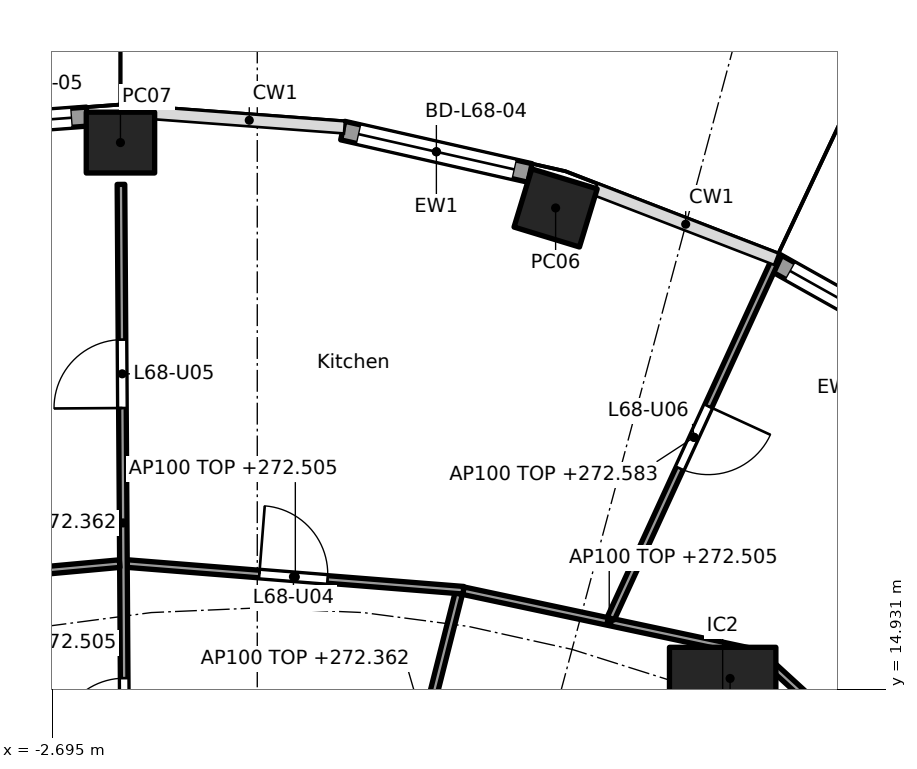
"""IFC4 building model, lengths in metres.
Left out: names, types, materials, properties, quantities, classifications, styles, units other than length and angle.
Written with IfcOpenShell. Run it as: python <this file> out.ifc"""

import sys

from ifc_helpers import new_model, si_unit, direction, frame, frame_2d, origin, origin_2d, place, context, subcontext, project, spatial, rectangle, hollow_rectangle, extrude, element, fill, save


model = new_model("IFC4")
c1 = context("Model", 3, precision=1e-05, world=origin(), true_north=direction((0.0, 1.0)))
c2 = subcontext(c1, "Body", "Model", "MODEL_VIEW")
j1 = project(units=[si_unit("LENGTHUNIT", "METRE"), si_unit("PLANEANGLEUNIT", "RADIAN")], contexts=[c1])
p1 = place(None, origin())
s1 = spatial("IfcSite", under=j1, at=p1, CompositionType="ELEMENT")
p2 = place(p1, origin())
s2 = spatial("IfcBuilding", under=s1, at=p2, CompositionType="ELEMENT")
p3 = place(p2, frame((0.0, 0.0, 269.6)))
s3 = spatial("IfcBuildingStorey", under=s2, at=p3, CompositionType="ELEMENT", Elevation=269.6)
for number, where, z_axis, x_axis in (
    (1, (3.925, 21.262, 0.0), (0.0, 0.0, 1.0), (-0.957, 0.292, 0.0)),
    (2, (-1.8, 22.122, 0.0), (0.0, 0.0, 1.0), (-1.0, 0.0, 0.0)),
):
    element("IfcColumn", number, at=place(p3, frame(where, z_axis=z_axis, x_axis=x_axis)), inside=s3, PredefinedType="COLUMN", context=c2, shape_type="SweptSolid", body=[
        extrude(hollow_rectangle(XDim=0.9, YDim=0.8, WallThickness=0.028, at=origin_2d()), origin(), (0.0, 0.0, 1.0), 3.7),
    ])
p4 = place(p3, frame((6.123, 14.782, 0.0), z_axis=(0.0, 0.0, 1.0), x_axis=(1.0, 0.0, 0.0)))
e3 = element("IfcColumn", 3, at=p4, inside=s3, PredefinedType="COLUMN", context=c2, shape_type="SweptSolid", body=[
    extrude(rectangle(XDim=1.4, YDim=1.4, at=origin_2d()), origin(), (0.0, 0.0, 1.0), 3.7),
])
p5 = place(p3, frame((6.795, 20.554, 0.0), z_axis=(0.0, 0.0, 1.0), x_axis=(0.872052877201, -0.489411666561, 0.0)))
e4 = element("IfcWall", 4, at=p5, inside=s3, PredefinedType="SOLIDWALL", context=c2, shape_type="SweptSolid", body=[
    extrude(rectangle(XDim=2.593, YDim=0.25, at=frame_2d((1.296, 0.0))), origin(), (0.0, 0.0, 1.0), 3.44),
])
p6 = place(p5, frame((0.247, 0.0, 0.0)))
e5 = element("IfcOpeningElement", 5, at=p6, cuts=e4, PredefinedType="OPENING", context=c2, shape_type="SweptSolid", body=[
    extrude(rectangle(XDim=2.1, YDim=2.4, at=frame_2d((1.05, 1.2))), frame((0.0, 0.135, 0.0), z_axis=(0.0, -1.0, 0.0), x_axis=(1.0, 0.0, 0.0)), (0.0, 0.0, 1.0), 0.27),
])
p7 = place(p3, frame((1.125, 22.28, 0.0), z_axis=(0.0, 0.0, 1.0), x_axis=(0.97531487046, -0.22081871175, 0.0)))
e6 = element("IfcWall", 6, at=p7, inside=s3, PredefinedType="SOLIDWALL", context=c2, shape_type="SweptSolid", body=[
    extrude(rectangle(XDim=2.525, YDim=0.25, at=frame_2d((1.263, 0.0))), origin(), (0.0, 0.0, 1.0), 3.44),
])
p8 = place(p7, frame((0.213, 0.0, 0.0)))
e7 = element("IfcOpeningElement", 7, at=p8, cuts=e6, PredefinedType="OPENING", context=c2, shape_type="SweptSolid", body=[
    extrude(rectangle(XDim=2.1, YDim=2.4, at=frame_2d((1.05, 1.2))), frame((0.0, 0.135, 0.0), z_axis=(0.0, -1.0, 0.0), x_axis=(1.0, 0.0, 0.0)), (0.0, 0.0, 1.0), 0.27),
])
p9 = place(p3, frame((-4.743, 22.277, 0.0), z_axis=(0.0, 0.0, 1.0), x_axis=(0.99722914645, 0.074391057731, 0.0)))
e8 = element("IfcWall", 8, at=p9, inside=s3, PredefinedType="SOLIDWALL", context=c2, shape_type="SweptSolid", body=[
    extrude(rectangle(XDim=2.51, YDim=0.25, at=frame_2d((1.255, 0.0))), origin(), (0.0, 0.0, 1.0), 3.44),
])
p10 = place(p9, frame((0.205, 0.0, 0.0)))
e9 = element("IfcOpeningElement", 9, at=p10, cuts=e8, PredefinedType="OPENING", context=c2, shape_type="SweptSolid", body=[
    extrude(rectangle(XDim=2.1, YDim=2.4, at=frame_2d((1.05, 1.2))), frame((0.0, 0.135, 0.0), z_axis=(0.0, -1.0, 0.0), x_axis=(1.0, 0.0, 0.0)), (0.0, 0.0, 1.0), 0.27),
])
p11 = place(p3, frame((10.972, 11.398, 0.0), z_axis=(0.0, 0.0, 1.0), x_axis=(-0.737838738013, 0.674977034193, 0.0)))
e10 = element("IfcWall", 10, at=p11, inside=s3, PredefinedType="PARTITIONING", context=c2, shape_type="SweptSolid", body=[
    extrude(rectangle(XDim=5.977, YDim=0.1, at=frame_2d((2.989, 0.0))), origin(), (0.0, 0.0, 1.0), 2.905),
])
p12 = place(p11, frame((2.514, 0.0, 0.0)))
e11 = element("IfcOpeningElement", 11, at=p12, cuts=e10, PredefinedType="OPENING", context=c2, shape_type="SweptSolid", body=[
    extrude(rectangle(XDim=0.9, YDim=2.1, at=frame_2d((0.45, 1.05))), frame((0.0, 0.06, 0.0), z_axis=(0.0, -1.0, 0.0), x_axis=(1.0, 0.0, 0.0)), (0.0, 0.0, 1.0), 0.12),
])
p13 = place(p3, frame((6.55, 15.409, 0.0), z_axis=(0.0, 0.0, 1.0), x_axis=(-0.978051195976, 0.208364723621, 0.0)))
e12 = element("IfcWall", 12, at=p13, inside=s3, PredefinedType="PARTITIONING", context=c2, shape_type="SweptSolid", body=[
    extrude(rectangle(XDim=3.924, YDim=0.1, at=frame_2d((1.962, 0.0))), origin(), (0.0, 0.0, 1.0), 2.905),
])
p14 = place(p3, frame((4.651, 15.863, 0.0), z_axis=(0.0, 0.0, 1.0), x_axis=(0.41744196735, 0.908703584176, 0.0)))
e13 = element("IfcWall", 13, at=p14, inside=s3, PredefinedType="PARTITIONING", context=c2, shape_type="SweptSolid", body=[
    extrude(rectangle(XDim=5.242, YDim=0.1, at=frame_2d((2.621, 0.0))), origin(), (0.0, 0.0, 1.0), 2.983),
])
p15 = place(p14, frame((2.171, 0.0, 0.0)))
e14 = element("IfcOpeningElement", 14, at=p15, cuts=e13, PredefinedType="OPENING", context=c2, shape_type="SweptSolid", body=[
    extrude(rectangle(XDim=0.9, YDim=2.1, at=frame_2d((0.45, 1.05))), frame((0.0, 0.06, 0.0), z_axis=(0.0, -1.0, 0.0), x_axis=(1.0, 0.0, 0.0)), (0.0, 0.0, 1.0), 0.12),
])
p16 = place(p3, frame((1.759, 12.662, 0.0), z_axis=(0.0, 0.0, 1.0), x_axis=(0.244966765147, 0.969531476525, 0.0)))
e15 = element("IfcWall", 15, at=p16, inside=s3, PredefinedType="PARTITIONING", context=c2, shape_type="SweptSolid", body=[
    extrude(rectangle(XDim=3.638, YDim=0.1, at=frame_2d((1.819, 0.0))), origin(), (0.0, 0.0, 1.0), 2.762),
])
p17 = place(p16, frame((1.369, 0.0, 0.0)))
e16 = element("IfcOpeningElement", 16, at=p17, cuts=e15, PredefinedType="OPENING", context=c2, shape_type="SweptSolid", body=[
    extrude(rectangle(XDim=0.9, YDim=2.1, at=frame_2d((0.45, 1.05))), frame((0.0, 0.06, 0.0), z_axis=(0.0, -1.0, 0.0), x_axis=(1.0, 0.0, 0.0)), (0.0, 0.0, 1.0), 0.12),
])
p18 = place(p3, frame((2.713, 16.233, 0.0), z_axis=(0.0, 0.0, 1.0), x_axis=(-0.996870142942, 0.079056423588, 0.0)))
e17 = element("IfcWall", 17, at=p18, inside=s3, PredefinedType="PARTITIONING", context=c2, shape_type="SweptSolid", body=[
    extrude(rectangle(XDim=4.438, YDim=0.1, at=frame_2d((2.219, 0.0))), origin(), (0.0, 0.0, 1.0), 2.905),
])
p19 = place(p18, frame((1.794, 0.0, 0.0)))
e18 = element("IfcOpeningElement", 18, at=p19, cuts=e17, PredefinedType="OPENING", context=c2, shape_type="SweptSolid", body=[
    extrude(rectangle(XDim=0.9, YDim=2.1, at=frame_2d((0.45, 1.05))), frame((0.0, 0.06, 0.0), z_axis=(0.0, -1.0, 0.0), x_axis=(1.0, 0.0, 0.0)), (0.0, 0.0, 1.0), 0.12),
])
p20 = place(p3, frame((-1.736, 12.665, 0.0), z_axis=(0.0, 0.0, 1.0), x_axis=(-0.00646827636, 0.999979080482, 0.0)))
e19 = element("IfcWall", 19, at=p20, inside=s3, PredefinedType="PARTITIONING", context=c2, shape_type="SweptSolid", body=[
    extrude(rectangle(XDim=8.908, YDim=0.1, at=frame_2d((4.454, 0.0))), origin(), (0.0, 0.0, 1.0), 2.762),
])
p21 = place(p20, frame((1.512, 0.0, 0.0)))
e20 = element("IfcOpeningElement", 20, at=p21, cuts=e19, PredefinedType="OPENING", context=c2, shape_type="SweptSolid", body=[
    extrude(rectangle(XDim=0.9, YDim=2.1, at=frame_2d((0.45, 1.05))), frame((0.0, 0.06, 0.0), z_axis=(0.0, -1.0, 0.0), x_axis=(1.0, 0.0, 0.0)), (0.0, 0.0, 1.0), 0.12),
])
p22 = place(p20, frame((5.965, 0.0, 0.0)))
e21 = element("IfcOpeningElement", 21, at=p22, cuts=e19, PredefinedType="OPENING", context=c2, shape_type="SweptSolid", body=[
    extrude(rectangle(XDim=0.9, YDim=2.1, at=frame_2d((0.45, 1.05))), frame((0.0, 0.06, 0.0), z_axis=(0.0, -1.0, 0.0), x_axis=(1.0, 0.0, 0.0)), (0.0, 0.0, 1.0), 0.12),
])
p23 = place(p3, frame((-1.811, 16.583, 0.0), z_axis=(0.0, 0.0, 1.0), x_axis=(-0.995842301034, -0.091093970555, 0.0)))
e22 = element("IfcWall", 22, at=p23, inside=s3, PredefinedType="PARTITIONING", context=c2, shape_type="SweptSolid", body=[
    extrude(rectangle(XDim=4.535, YDim=0.1, at=frame_2d((2.267, 0.0))), origin(), (0.0, 0.0, 1.0), 2.905),
])
p24 = place(p3, frame((6.388, 15.29, 0.0), z_axis=(0.0, 0.0, 1.0), x_axis=(-0.610612392422, -0.791929609385, 0.0)))
e23 = element("IfcWall", 23, at=p24, inside=s3, PredefinedType="PARTITIONING", context=c2, shape_type="SweptSolid", body=[
    extrude(rectangle(XDim=0.549, YDim=0.1, at=frame_2d((0.275, 0.0))), origin(), (0.0, 0.0, 1.0), 3.44),
])
p25 = place(p6, origin())
e24 = element("IfcDoor", 24, at=p25, inside=s3, OperationType="SLIDING_TO_LEFT", PredefinedType="DOOR", context=c2, shape_type="SweptSolid", body=[
    extrude(rectangle(XDim=2.1, YDim=2.4, at=frame_2d((1.05, 1.2))), frame((0.0, 0.025, 0.0), z_axis=(0.0, -1.0, 0.0), x_axis=(1.0, 0.0, 0.0)), (0.0, 0.0, 1.0), 0.05),
])
fill(e5, e24)
p26 = place(p8, origin())
e25 = element("IfcDoor", 25, at=p26, inside=s3, OperationType="SLIDING_TO_LEFT", PredefinedType="DOOR", context=c2, shape_type="SweptSolid", body=[
    extrude(rectangle(XDim=2.1, YDim=2.4, at=frame_2d((1.05, 1.2))), frame((0.0, 0.025, 0.0), z_axis=(0.0, -1.0, 0.0), x_axis=(1.0, 0.0, 0.0)), (0.0, 0.0, 1.0), 0.05),
])
fill(e7, e25)
p27 = place(p10, origin())
e26 = element("IfcDoor", 26, at=p27, inside=s3, OperationType="SLIDING_TO_LEFT", PredefinedType="DOOR", context=c2, shape_type="SweptSolid", body=[
    extrude(rectangle(XDim=2.1, YDim=2.4, at=frame_2d((1.05, 1.2))), frame((0.0, 0.025, 0.0), z_axis=(0.0, -1.0, 0.0), x_axis=(1.0, 0.0, 0.0)), (0.0, 0.0, 1.0), 0.05),
])
fill(e9, e26)
p28 = place(p21, origin())
e27 = element("IfcDoor", 27, at=p28, inside=s3, OperationType="SINGLE_SWING_LEFT", PredefinedType="DOOR", context=c2, shape_type="SweptSolid", body=[
    extrude(rectangle(XDim=0.9, YDim=2.1, at=frame_2d((0.45, 1.05))), frame((0.0, 0.025, 0.0), z_axis=(0.0, -1.0, 0.0), x_axis=(1.0, 0.0, 0.0)), (0.0, 0.0, 1.0), 0.05),
])
fill(e20, e27)
p29 = place(p19, frame((0.9, 0.0, 0.0), x_axis=(-1.0, 0.0, 0.0)))
e28 = element("IfcDoor", 28, at=p29, inside=s3, OperationType="SINGLE_SWING_LEFT", PredefinedType="DOOR", context=c2, shape_type="SweptSolid", body=[
    extrude(rectangle(XDim=0.9, YDim=2.1, at=frame_2d((0.45, 1.05))), frame((0.0, 0.025, 0.0), z_axis=(0.0, -1.0, 0.0), x_axis=(1.0, 0.0, 0.0)), (0.0, 0.0, 1.0), 0.05),
])
fill(e18, e28)
p30 = place(p22, origin())
e29 = element("IfcDoor", 29, at=p30, inside=s3, OperationType="SINGLE_SWING_LEFT", PredefinedType="DOOR", context=c2, shape_type="SweptSolid", body=[
    extrude(rectangle(XDim=0.9, YDim=2.1, at=frame_2d((0.45, 1.05))), frame((0.0, 0.025, 0.0), z_axis=(0.0, -1.0, 0.0), x_axis=(1.0, 0.0, 0.0)), (0.0, 0.0, 1.0), 0.05),
])
fill(e21, e29)
p31 = place(p15, frame((0.9, 0.0, 0.0), x_axis=(-1.0, 0.0, 0.0)))
e30 = element("IfcDoor", 30, at=p31, inside=s3, OperationType="SINGLE_SWING_LEFT", PredefinedType="DOOR", context=c2, shape_type="SweptSolid", body=[
    extrude(rectangle(XDim=0.9, YDim=2.1, at=frame_2d((0.45, 1.05))), frame((0.0, 0.025, 0.0), z_axis=(0.0, -1.0, 0.0), x_axis=(1.0, 0.0, 0.0)), (0.0, 0.0, 1.0), 0.05),
])
fill(e14, e30)
save(model, sys.argv[1])
